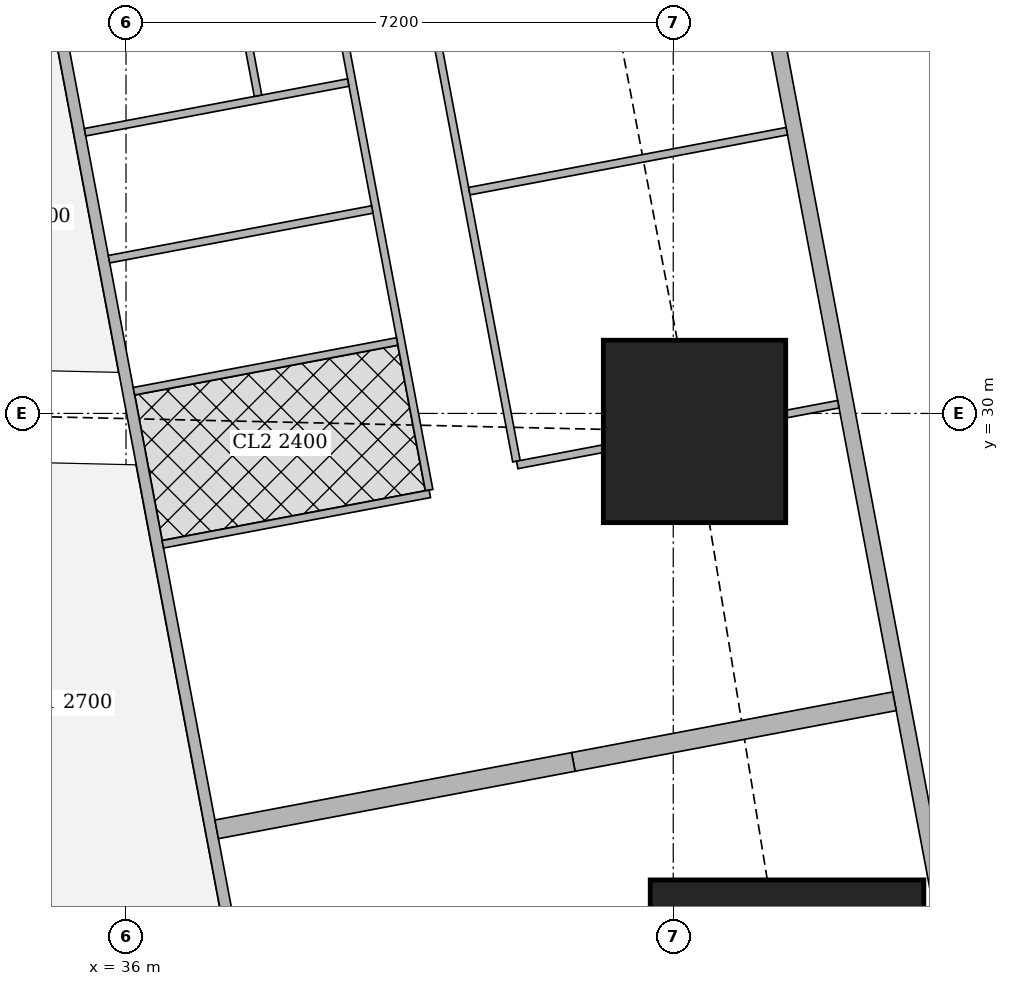
"""IFC4 building model, lengths in metres.
Left out: names, types, materials, properties, quantities, classifications, styles, units other than length and angle.
Written with IfcOpenShell. Run it as: python <this file> out.ifc"""

import sys

from ifc_helpers import new_model, si_unit, direction, frame, frame_2d, origin, origin_2d, place, context, subcontext, project, spatial, rectangle, extrude, element, fill, save


model = new_model("IFC4")
c1 = context("Model", 3, precision=1e-05, world=origin(), true_north=direction((0.0, 1.0)))
c2 = subcontext(c1, "Body", "Model", "MODEL_VIEW")
j1 = project(units=[si_unit("LENGTHUNIT", "METRE"), si_unit("PLANEANGLEUNIT", "RADIAN")], contexts=[c1])
p1 = place(None, origin())
s1 = spatial("IfcSite", under=j1, at=p1, CompositionType="ELEMENT")
p2 = place(p1, origin())
s2 = spatial("IfcBuilding", under=s1, at=p2, CompositionType="ELEMENT")
p3 = place(p2, frame((0.0, 0.0, 223.7)))
s3 = spatial("IfcBuildingStorey", under=s2, at=p3, CompositionType="ELEMENT", Elevation=223.7)
p4 = place(p3, frame((44.697, 22.263, 0.0), z_axis=(0.0, 0.0, 1.0), x_axis=(1.0, 0.0, 0.0)))
e1 = element("IfcColumn", 1, at=p4, inside=s3, PredefinedType="COLUMN", context=c2, shape_type="SweptSolid", body=[
    extrude(rectangle(XDim=3.6, YDim=3.2, at=origin_2d()), origin(), (0.0, 0.0, 1.0), 3.75),
])
p5 = place(p3, frame((43.48, 29.763, 0.0), z_axis=(0.0, 0.0, 1.0), x_axis=(1.0, 0.0, 0.0)))
e2 = element("IfcColumn", 2, at=p5, inside=s3, PredefinedType="COLUMN", context=c2, shape_type="SweptSolid", body=[
    extrude(rectangle(XDim=2.4, YDim=2.4, at=origin_2d()), origin(), (0.0, 0.0, 1.0), 3.75),
])
p6 = place(p3, frame((50.653, 2.703, 0.0), z_axis=(0.0, 0.0, 1.0), x_axis=(-0.185612026696, 0.982623109613, 0.0)))
e3 = element("IfcWall", 3, at=p6, inside=s3, PredefinedType="SOLIDWALL", context=c2, shape_type="SweptSolid", body=[
    extrude(rectangle(XDim=41.393, YDim=0.2, at=frame_2d((20.697, 0.0))), origin(), (0.0, 0.0, 1.0), 3.5),
])
p7 = place(p6, frame((1.633, 0.0, 0.9)))
e4 = element("IfcOpeningElement", 4, at=p7, cuts=e3, PredefinedType="OPENING", context=c2, shape_type="SweptSolid", body=[
    extrude(rectangle(XDim=1.8, YDim=1.5, at=frame_2d((0.9, 0.75))), frame((0.0, 0.11, 0.0), z_axis=(0.0, -1.0, 0.0), x_axis=(1.0, 0.0, 0.0)), (0.0, 0.0, 1.0), 0.22),
])
p8 = place(p6, frame((6.032, 0.0, 0.9)))
e5 = element("IfcOpeningElement", 5, at=p8, cuts=e3, PredefinedType="OPENING", context=c2, shape_type="SweptSolid", body=[
    extrude(rectangle(XDim=1.8, YDim=1.5, at=frame_2d((0.9, 0.75))), frame((0.0, 0.11, 0.0), z_axis=(0.0, -1.0, 0.0), x_axis=(1.0, 0.0, 0.0)), (0.0, 0.0, 1.0), 0.22),
])
p9 = place(p6, frame((9.848, 0.0, 0.9)))
e6 = element("IfcOpeningElement", 6, at=p9, cuts=e3, PredefinedType="OPENING", context=c2, shape_type="SweptSolid", body=[
    extrude(rectangle(XDim=1.8, YDim=1.5, at=frame_2d((0.9, 0.75))), frame((0.0, 0.11, 0.0), z_axis=(0.0, -1.0, 0.0), x_axis=(1.0, 0.0, 0.0)), (0.0, 0.0, 1.0), 0.22),
])
p10 = place(p6, frame((13.664, 0.0, 0.9)))
e7 = element("IfcOpeningElement", 7, at=p10, cuts=e3, PredefinedType="OPENING", context=c2, shape_type="SweptSolid", body=[
    extrude(rectangle(XDim=1.8, YDim=1.5, at=frame_2d((0.9, 0.75))), frame((0.0, 0.11, 0.0), z_axis=(0.0, -1.0, 0.0), x_axis=(1.0, 0.0, 0.0)), (0.0, 0.0, 1.0), 0.22),
])
p11 = place(p6, frame((17.481, 0.0, 0.9)))
e8 = element("IfcOpeningElement", 8, at=p11, cuts=e3, PredefinedType="OPENING", context=c2, shape_type="SweptSolid", body=[
    extrude(rectangle(XDim=1.8, YDim=1.5, at=frame_2d((0.9, 0.75))), frame((0.0, 0.11, 0.0), z_axis=(0.0, -1.0, 0.0), x_axis=(1.0, 0.0, 0.0)), (0.0, 0.0, 1.0), 0.22),
])
p12 = place(p6, frame((21.297, 0.0, 0.9)))
e9 = element("IfcOpeningElement", 9, at=p12, cuts=e3, PredefinedType="OPENING", context=c2, shape_type="SweptSolid", body=[
    extrude(rectangle(XDim=1.8, YDim=1.5, at=frame_2d((0.9, 0.75))), frame((0.0, 0.11, 0.0), z_axis=(0.0, -1.0, 0.0), x_axis=(1.0, 0.0, 0.0)), (0.0, 0.0, 1.0), 0.22),
])
p13 = place(p6, frame((25.113, 0.0, 0.9)))
e10 = element("IfcOpeningElement", 10, at=p13, cuts=e3, PredefinedType="OPENING", context=c2, shape_type="SweptSolid", body=[
    extrude(rectangle(XDim=1.8, YDim=1.5, at=frame_2d((0.9, 0.75))), frame((0.0, 0.11, 0.0), z_axis=(0.0, -1.0, 0.0), x_axis=(1.0, 0.0, 0.0)), (0.0, 0.0, 1.0), 0.22),
])
p14 = place(p6, frame((28.93, 0.0, 0.9)))
e11 = element("IfcOpeningElement", 11, at=p14, cuts=e3, PredefinedType="OPENING", context=c2, shape_type="SweptSolid", body=[
    extrude(rectangle(XDim=1.8, YDim=1.5, at=frame_2d((0.9, 0.75))), frame((0.0, 0.11, 0.0), z_axis=(0.0, -1.0, 0.0), x_axis=(1.0, 0.0, 0.0)), (0.0, 0.0, 1.0), 0.22),
])
p15 = place(p6, frame((32.746, 0.0, 0.9)))
e12 = element("IfcOpeningElement", 12, at=p15, cuts=e3, PredefinedType="OPENING", context=c2, shape_type="SweptSolid", body=[
    extrude(rectangle(XDim=1.8, YDim=1.5, at=frame_2d((0.9, 0.75))), frame((0.0, 0.11, 0.0), z_axis=(0.0, -1.0, 0.0), x_axis=(1.0, 0.0, 0.0)), (0.0, 0.0, 1.0), 0.22),
])
p16 = place(p6, frame((36.481, 0.0, 0.9)))
e13 = element("IfcOpeningElement", 13, at=p16, cuts=e3, PredefinedType="OPENING", context=c2, shape_type="SweptSolid", body=[
    extrude(rectangle(XDim=1.8, YDim=1.5, at=frame_2d((0.9, 0.75))), frame((0.0, 0.11, 0.0), z_axis=(0.0, -1.0, 0.0), x_axis=(1.0, 0.0, 0.0)), (0.0, 0.0, 1.0), 0.22),
])
p17 = place(p3, frame((33.68, 42.723, 0.0), z_axis=(0.0, 0.0, 1.0), x_axis=(0.185601160014, -0.982625162207, 0.0)))
e14 = element("IfcWall", 14, at=p17, inside=s3, PredefinedType="SOLIDWALL", context=c2, shape_type="SweptSolid", body=[
    extrude(rectangle(XDim=41.051, YDim=0.15, at=frame_2d((20.526, 0.0))), origin(), (0.0, 0.0, 1.0), 2.5),
])
p18 = place(p17, frame((16.123, 0.0, 0.0)))
e15 = element("IfcOpeningElement", 15, at=p18, cuts=e14, PredefinedType="OPENING", context=c2, shape_type="SweptSolid", body=[
    extrude(rectangle(XDim=1.0, YDim=2.1, at=frame_2d((0.5, 1.05))), frame((0.0, 0.085, 0.0), z_axis=(0.0, -1.0, 0.0), x_axis=(1.0, 0.0, 0.0)), (0.0, 0.0, 1.0), 0.17),
])
p19 = place(p17, frame((19.938, 0.0, 0.0)))
e16 = element("IfcOpeningElement", 16, at=p19, cuts=e14, PredefinedType="OPENING", context=c2, shape_type="SweptSolid", body=[
    extrude(rectangle(XDim=1.0, YDim=2.1, at=frame_2d((0.5, 1.05))), frame((0.0, 0.085, 0.0), z_axis=(0.0, -1.0, 0.0), x_axis=(1.0, 0.0, 0.0)), (0.0, 0.0, 1.0), 0.17),
])
p20 = place(p17, frame((30.902, 0.0, 0.0)))
e17 = element("IfcOpeningElement", 17, at=p20, cuts=e14, PredefinedType="OPENING", context=c2, shape_type="SweptSolid", body=[
    extrude(rectangle(XDim=1.0, YDim=2.1, at=frame_2d((0.5, 1.05))), frame((0.0, 0.085, 0.0), z_axis=(0.0, -1.0, 0.0), x_axis=(1.0, 0.0, 0.0)), (0.0, 0.0, 1.0), 0.17),
])
p21 = place(p3, frame((38.764, 41.941, 0.0), z_axis=(0.0, 0.0, 1.0), x_axis=(0.185512176227, -0.982641965556, 0.0)))
e18 = element("IfcWall", 18, at=p21, inside=s3, PredefinedType="PARTITIONING", context=c2, shape_type="SweptSolid", body=[
    extrude(rectangle(XDim=12.792, YDim=0.1, at=frame_2d((6.396, 0.0))), origin(), (0.0, 0.0, 1.0), 2.5),
])
p22 = place(p21, frame((11.35, 0.0, 0.0)))
e19 = element("IfcOpeningElement", 19, at=p22, cuts=e18, PredefinedType="OPENING", context=c2, shape_type="SweptSolid", body=[
    extrude(rectangle(XDim=0.9, YDim=2.1, at=frame_2d((0.45, 1.05))), frame((0.0, 0.06, 0.0), z_axis=(0.0, -1.0, 0.0), x_axis=(1.0, 0.0, 0.0)), (0.0, 0.0, 1.0), 0.12),
])
p23 = place(p21, frame((8.085, 0.0, 0.0)))
e20 = element("IfcOpeningElement", 20, at=p23, cuts=e18, PredefinedType="OPENING", context=c2, shape_type="SweptSolid", body=[
    extrude(rectangle(XDim=0.9, YDim=2.1, at=frame_2d((0.45, 1.05))), frame((0.0, 0.06, 0.0), z_axis=(0.0, -1.0, 0.0), x_axis=(1.0, 0.0, 0.0)), (0.0, 0.0, 1.0), 0.12),
])
p24 = place(p21, frame((3.7, 0.0, 0.0)))
e21 = element("IfcOpeningElement", 21, at=p24, cuts=e18, PredefinedType="OPENING", context=c2, shape_type="SweptSolid", body=[
    extrude(rectangle(XDim=0.9, YDim=2.1, at=frame_2d((0.45, 1.05))), frame((0.0, 0.06, 0.0), z_axis=(0.0, -1.0, 0.0), x_axis=(1.0, 0.0, 0.0)), (0.0, 0.0, 1.0), 0.12),
])
p25 = place(p3, frame((37.473, 42.309, 0.0), z_axis=(0.0, 0.0, 1.0), x_axis=(0.185570636839, -0.982630927024, 0.0)))
e22 = element("IfcWall", 22, at=p25, inside=s3, PredefinedType="PARTITIONING", context=c2, shape_type="SweptSolid", body=[
    extrude(rectangle(XDim=13.553, YDim=0.1, at=frame_2d((6.777, 0.0))), origin(), (0.0, 0.0, 1.0), 2.5),
])
p26 = place(p25, frame((12.128, 0.0, 0.0)))
e23 = element("IfcOpeningElement", 23, at=p26, cuts=e22, PredefinedType="OPENING", context=c2, shape_type="SweptSolid", body=[
    extrude(rectangle(XDim=0.9, YDim=2.1, at=frame_2d((0.45, 1.05))), frame((0.0, 0.06, 0.0), z_axis=(0.0, -1.0, 0.0), x_axis=(1.0, 0.0, 0.0)), (0.0, 0.0, 1.0), 0.12),
])
p27 = place(p25, frame((8.487, 0.0, 0.0)))
e24 = element("IfcOpeningElement", 24, at=p27, cuts=e22, PredefinedType="OPENING", context=c2, shape_type="SweptSolid", body=[
    extrude(rectangle(XDim=0.9, YDim=2.1, at=frame_2d((0.45, 1.05))), frame((0.0, 0.06, 0.0), z_axis=(0.0, -1.0, 0.0), x_axis=(1.0, 0.0, 0.0)), (0.0, 0.0, 1.0), 0.12),
])
p28 = place(p25, frame((2.853, 0.0, 0.0)))
e25 = element("IfcOpeningElement", 25, at=p28, cuts=e22, PredefinedType="OPENING", context=c2, shape_type="SweptSolid", body=[
    extrude(rectangle(XDim=0.9, YDim=2.1, at=frame_2d((0.45, 1.05))), frame((0.0, 0.06, 0.0), z_axis=(0.0, -1.0, 0.0), x_axis=(1.0, 0.0, 0.0)), (0.0, 0.0, 1.0), 0.12),
])
p29 = place(p25, frame((10.22, 0.0, 0.0)))
e26 = element("IfcOpeningElement", 26, at=p29, cuts=e22, PredefinedType="OPENING", context=c2, shape_type="SweptSolid", body=[
    extrude(rectangle(XDim=0.9, YDim=2.1, at=frame_2d((0.45, 1.05))), frame((0.0, 0.06, 0.0), z_axis=(0.0, -1.0, 0.0), x_axis=(1.0, 0.0, 0.0)), (0.0, 0.0, 1.0), 0.12),
])
p30 = place(p25, frame((5.819, 0.0, 0.0)))
e27 = element("IfcOpeningElement", 27, at=p30, cuts=e22, PredefinedType="OPENING", context=c2, shape_type="SweptSolid", body=[
    extrude(rectangle(XDim=0.9, YDim=2.1, at=frame_2d((0.45, 1.05))), frame((0.0, 0.06, 0.0), z_axis=(0.0, -1.0, 0.0), x_axis=(1.0, 0.0, 0.0)), (0.0, 0.0, 1.0), 0.12),
])
p31 = place(p3, frame((44.693, 33.713, 0.0), z_axis=(0.0, 0.0, 1.0), x_axis=(-0.982623519589, -0.185609856287, 0.0)))
e28 = element("IfcWall", 28, at=p31, inside=s3, PredefinedType="PARTITIONING", context=c2, shape_type="SweptSolid", body=[
    extrude(rectangle(XDim=4.25, YDim=0.1, at=frame_2d((2.125, 0.0))), origin(), (0.0, 0.0, 1.0), 2.05),
])
p32 = place(p3, frame((45.372, 30.121, 0.0), z_axis=(0.0, 0.0, 1.0), x_axis=(-0.98254419619, -0.186029305578, 0.0)))
e29 = element("IfcWall", 29, at=p32, inside=s3, PredefinedType="PARTITIONING", context=c2, shape_type="SweptSolid", body=[
    extrude(rectangle(XDim=0.694, YDim=0.1, at=frame_2d((0.347, 0.0))), origin(), (0.0, 0.0, 1.0), 3.5),
])
p33 = place(p3, frame((42.27, 29.535, 0.0), z_axis=(0.0, 0.0, 1.0), x_axis=(-0.982502700549, -0.186248338017, 0.0)))
e30 = element("IfcWall", 30, at=p33, inside=s3, PredefinedType="PARTITIONING", context=c2, shape_type="SweptSolid", body=[
    extrude(rectangle(XDim=1.143, YDim=0.1, at=frame_2d((0.572, 0.0))), origin(), (0.0, 0.0, 1.0), 2.5),
])
p34 = place(p3, frame((39.24, 32.683, 0.0), z_axis=(0.0, 0.0, 1.0), x_axis=(-0.982638553676, -0.185530247748, 0.0)))
e31 = element("IfcWall", 31, at=p34, inside=s3, PredefinedType="PARTITIONING", context=c2, shape_type="SweptSolid", body=[
    extrude(rectangle(XDim=3.525, YDim=0.1, at=frame_2d((1.763, 0.0))), origin(), (0.0, 0.0, 1.0), 3.5),
])
p35 = place(p3, frame((39.997, 28.942, 0.0), z_axis=(0.0, 0.0, 1.0), x_axis=(-0.982613029841, -0.185665380691, 0.0)))
e32 = element("IfcWall", 32, at=p35, inside=s3, PredefinedType="PARTITIONING", context=c2, shape_type="SweptSolid", body=[
    extrude(rectangle(XDim=3.575, YDim=0.1, at=frame_2d((1.788, 0.0))), origin(), (0.0, 0.0, 1.0), 3.5),
])
p36 = place(p3, frame((39.567, 30.947, 0.0), z_axis=(0.0, 0.0, 1.0), x_axis=(-0.982576058723, -0.185860939478, 0.0)))
e33 = element("IfcWall", 33, at=p36, inside=s3, PredefinedType="PARTITIONING", context=c2, shape_type="SweptSolid", body=[
    extrude(rectangle(XDim=3.524, YDim=0.1, at=frame_2d((1.762, 0.0))), origin(), (0.0, 0.0, 1.0), 2.5),
])
p37 = place(p3, frame((38.924, 34.353, 0.0), z_axis=(0.0, 0.0, 1.0), x_axis=(-0.982629014545, -0.18558076348, 0.0)))
e34 = element("IfcWall", 34, at=p37, inside=s3, PredefinedType="PARTITIONING", context=c2, shape_type="SweptSolid", body=[
    extrude(rectangle(XDim=3.524, YDim=0.1, at=frame_2d((1.762, 0.0))), origin(), (0.0, 0.0, 1.0), 3.5),
])
p38 = place(p3, frame((46.11, 26.213, 0.0), z_axis=(0.0, 0.0, 1.0), x_axis=(-0.982633535512, -0.185556823879, 0.0)))
e35 = element("IfcWall", 35, at=p38, inside=s3, PredefinedType="SOLIDWALL", context=c2, shape_type="SweptSolid", body=[
    extrude(rectangle(XDim=4.3, YDim=0.25, at=frame_2d((2.15, 0.0))), origin(), (0.0, 0.0, 1.0), 2.05),
])
p39 = place(p3, frame((41.885, 25.415, 0.0), z_axis=(0.0, 0.0, 1.0), x_axis=(-0.982596737686, -0.185751584349, 0.0)))
e36 = element("IfcWall", 36, at=p39, inside=s3, PredefinedType="SOLIDWALL", context=c2, shape_type="SweptSolid", body=[
    extrude(rectangle(XDim=4.775, YDim=0.25, at=frame_2d((2.387, 0.0))), origin(), (0.0, 0.0, 1.0), 3.5),
])
p40 = place(p3, frame((37.08, 37.653, 0.0), z_axis=(0.0, 0.0, 1.0), x_axis=(0.185864634688, -0.982575359742, 0.0)))
e37 = element("IfcWall", 37, at=p40, inside=s3, PredefinedType="PARTITIONING", context=c2, shape_type="SweptSolid", body=[
    extrude(rectangle(XDim=3.535, YDim=0.1, at=frame_2d((1.767, 0.0))), origin(), (0.0, 0.0, 1.0), 3.5),
])
p41 = place(p40, frame((1.317, 0.0, 0.0)))
e38 = element("IfcOpeningElement", 38, at=p41, cuts=e37, PredefinedType="OPENING", context=c2, shape_type="SweptSolid", body=[
    extrude(rectangle(XDim=0.9, YDim=2.1, at=frame_2d((0.45, 1.05))), frame((0.0, 0.06, 0.0), z_axis=(0.0, -1.0, 0.0), x_axis=(1.0, 0.0, 0.0)), (0.0, 0.0, 1.0), 0.12),
])
p42 = place(p3, frame((35.576, 15.713, 0.0), z_axis=(0.0, 0.0, 1.0), x_axis=(-0.185602982696, 0.982624817931, 0.0)))
e39 = element("IfcWall", 39, at=p42, inside=s3, PredefinedType="PARTITIONING", context=c2, shape_type="SweptSolid", body=[
    extrude(rectangle(XDim=13.814, YDim=0.125, at=frame_2d((6.907, 0.0))), origin(), (0.0, 0.0, 1.0), 2.5),
])
p43 = place(p42, frame((5.3, 0.0, 0.0)))
e40 = element("IfcOpeningElement", 40, at=p43, cuts=e39, PredefinedType="OPENING", context=c2, shape_type="SweptSolid", body=[
    extrude(rectangle(XDim=1.0, YDim=2.1, at=frame_2d((0.5, 1.05))), frame((0.0, 0.073, 0.0), z_axis=(0.0, -1.0, 0.0), x_axis=(1.0, 0.0, 0.0)), (0.0, 0.0, 1.0), 0.145),
])
p44 = place(p12, origin())
e41 = element("IfcWindow", 41, at=p44, inside=s3, PartitioningType="SINGLE_PANEL", PredefinedType="WINDOW", context=c2, shape_type="SweptSolid", body=[
    extrude(rectangle(XDim=1.8, YDim=1.5, at=frame_2d((0.9, 0.75))), frame((0.0, 0.03, 0.0), z_axis=(0.0, -1.0, 0.0), x_axis=(1.0, 0.0, 0.0)), (0.0, 0.0, 1.0), 0.06),
])
fill(e9, e41)
p45 = place(p13, origin())
e42 = element("IfcWindow", 42, at=p45, inside=s3, PartitioningType="SINGLE_PANEL", PredefinedType="WINDOW", context=c2, shape_type="SweptSolid", body=[
    extrude(rectangle(XDim=1.8, YDim=1.5, at=frame_2d((0.9, 0.75))), frame((0.0, 0.03, 0.0), z_axis=(0.0, -1.0, 0.0), x_axis=(1.0, 0.0, 0.0)), (0.0, 0.0, 1.0), 0.06),
])
fill(e10, e42)
p46 = place(p14, origin())
e43 = element("IfcWindow", 43, at=p46, inside=s3, PartitioningType="SINGLE_PANEL", PredefinedType="WINDOW", context=c2, shape_type="SweptSolid", body=[
    extrude(rectangle(XDim=1.8, YDim=1.5, at=frame_2d((0.9, 0.75))), frame((0.0, 0.03, 0.0), z_axis=(0.0, -1.0, 0.0), x_axis=(1.0, 0.0, 0.0)), (0.0, 0.0, 1.0), 0.06),
])
fill(e11, e43)
p47 = place(p22, origin())
e44 = element("IfcDoor", 44, at=p47, inside=s3, OperationType="SINGLE_SWING_RIGHT", PredefinedType="DOOR", context=c2, shape_type="SweptSolid", body=[
    extrude(rectangle(XDim=0.9, YDim=2.1, at=frame_2d((0.45, 1.05))), frame((0.0, 0.025, 0.0), z_axis=(0.0, -1.0, 0.0), x_axis=(1.0, 0.0, 0.0)), (0.0, 0.0, 1.0), 0.05),
])
fill(e19, e44)
p48 = place(p23, origin())
e45 = element("IfcDoor", 45, at=p48, inside=s3, OperationType="SINGLE_SWING_RIGHT", PredefinedType="DOOR", context=c2, shape_type="SweptSolid", body=[
    extrude(rectangle(XDim=0.9, YDim=2.1, at=frame_2d((0.45, 1.05))), frame((0.0, 0.025, 0.0), z_axis=(0.0, -1.0, 0.0), x_axis=(1.0, 0.0, 0.0)), (0.0, 0.0, 1.0), 0.05),
])
fill(e20, e45)
p49 = place(p26, origin())
e46 = element("IfcDoor", 46, at=p49, inside=s3, OperationType="SINGLE_SWING_LEFT", PredefinedType="DOOR", context=c2, shape_type="SweptSolid", body=[
    extrude(rectangle(XDim=0.9, YDim=2.1, at=frame_2d((0.45, 1.05))), frame((0.0, 0.025, 0.0), z_axis=(0.0, -1.0, 0.0), x_axis=(1.0, 0.0, 0.0)), (0.0, 0.0, 1.0), 0.05),
])
fill(e23, e46)
p50 = place(p27, origin())
e47 = element("IfcDoor", 47, at=p50, inside=s3, OperationType="SINGLE_SWING_LEFT", PredefinedType="DOOR", context=c2, shape_type="SweptSolid", body=[
    extrude(rectangle(XDim=0.9, YDim=2.1, at=frame_2d((0.45, 1.05))), frame((0.0, 0.025, 0.0), z_axis=(0.0, -1.0, 0.0), x_axis=(1.0, 0.0, 0.0)), (0.0, 0.0, 1.0), 0.05),
])
fill(e24, e47)
p51 = place(p29, origin())
e48 = element("IfcDoor", 48, at=p51, inside=s3, OperationType="SINGLE_SWING_RIGHT", PredefinedType="DOOR", context=c2, shape_type="SweptSolid", body=[
    extrude(rectangle(XDim=0.9, YDim=2.1, at=frame_2d((0.45, 1.05))), frame((0.0, 0.025, 0.0), z_axis=(0.0, -1.0, 0.0), x_axis=(1.0, 0.0, 0.0)), (0.0, 0.0, 1.0), 0.05),
])
fill(e26, e48)
p52 = place(p18, origin())
e49 = element("IfcDoor", 49, at=p52, inside=s3, OperationType="SINGLE_SWING_LEFT", PredefinedType="DOOR", context=c2, shape_type="SweptSolid", body=[
    extrude(rectangle(XDim=1.0, YDim=2.1, at=frame_2d((0.5, 1.05))), frame((0.0, 0.025, 0.0), z_axis=(0.0, -1.0, 0.0), x_axis=(1.0, 0.0, 0.0)), (0.0, 0.0, 1.0), 0.05),
])
fill(e15, e49)
save(model, sys.argv[1])
